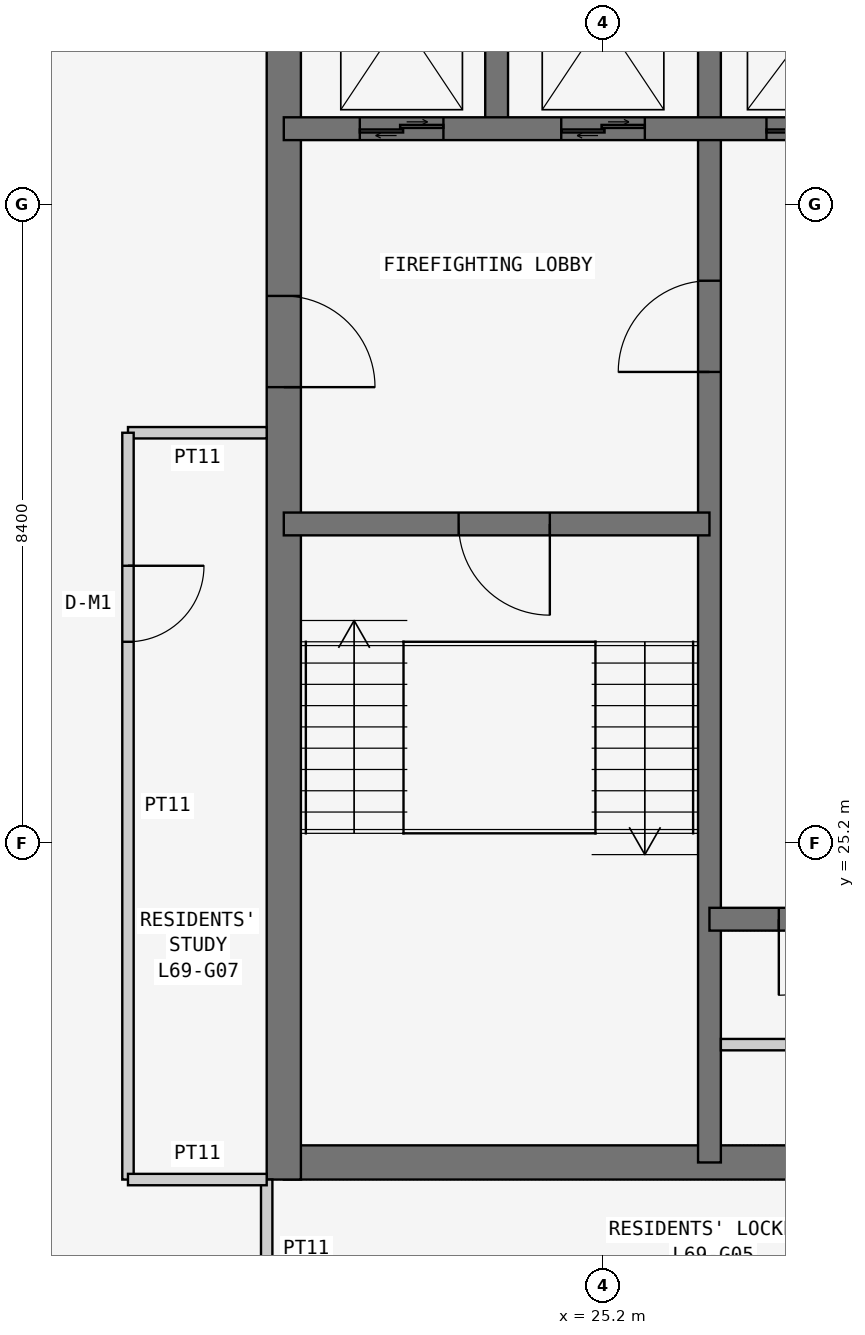
"""IFC4 building model, lengths in metres.
Left out: names, types, materials, properties, quantities, classifications, styles, units other than length and angle.
Written with IfcOpenShell. Run it as: python <this file> out.ifc"""

import sys

from ifc_helpers import new_model, si_unit, direction, frame, frame_2d, origin, place, context, subcontext, project, spatial, rectangle, extrude, element, fill, save


model = new_model("IFC4")
c1 = context("Model", 3, precision=1e-05, world=origin(), true_north=direction((0.0, 1.0)))
c2 = subcontext(c1, "Body", "Model", "MODEL_VIEW")
j1 = project(units=[si_unit("LENGTHUNIT", "METRE"), si_unit("PLANEANGLEUNIT", "RADIAN")], contexts=[c1])
p1 = place(None, origin())
s1 = spatial("IfcSite", under=j1, at=p1, CompositionType="ELEMENT")
p2 = place(p1, origin())
s2 = spatial("IfcBuilding", under=s1, at=p2, CompositionType="ELEMENT")
p3 = place(p2, frame((0.0, 0.0, 264.9)))
s3 = spatial("IfcBuildingStorey", under=s2, at=p3, CompositionType="ELEMENT", Elevation=264.9)
p4 = place(p3, frame((21.0, 21.0, 0.0), z_axis=(0.0, 0.0, 1.0), x_axis=(1.0, 0.0, 0.0)))
e1 = element("IfcWall", 1, at=p4, inside=s3, PredefinedType="SHEAR", context=c2, shape_type="SweptSolid", body=[
    extrude(rectangle(XDim=17.025, YDim=0.45, at=frame_2d((8.512, 0.0))), origin(), (0.0, 0.0, 1.0), 3.6),
])
p5 = place(p3, frame((21.0, 37.8, 0.0), z_axis=(0.0, 0.0, 1.0), x_axis=(0.0, -1.0, 0.0)))
e2 = element("IfcWall", 2, at=p5, inside=s3, PredefinedType="SHEAR", context=c2, shape_type="SweptSolid", body=[
    extrude(rectangle(XDim=17.025, YDim=0.45, at=frame_2d((8.513, 0.0))), origin(), (0.0, 0.0, 1.0), 3.6),
])
p6 = place(p5, frame((5.4, 0.0, 0.0)))
e3 = element("IfcOpeningElement", 3, at=p6, cuts=e2, PredefinedType="OPENING", context=c2, shape_type="SweptSolid", body=[
    extrude(rectangle(XDim=1.2, YDim=2.1, at=frame_2d((0.6, 1.05))), frame((0.0, 0.235, 0.0), z_axis=(0.0, -1.0, 0.0), x_axis=(1.0, 0.0, 0.0)), (0.0, 0.0, 1.0), 0.47),
])
p7 = place(p3, frame((26.6, 21.0, 0.0), z_axis=(0.0, 0.0, 1.0), x_axis=(0.0, 1.0, 0.0)))
e4 = element("IfcWall", 4, at=p7, inside=s3, PredefinedType="SHEAR", context=c2, shape_type="SweptSolid", body=[
    extrude(rectangle(XDim=16.8, YDim=0.3, at=frame_2d((8.4, 0.0))), origin(), (0.0, 0.0, 1.0), 3.6),
])
p8 = place(p7, frame((10.4, 0.0, 0.0)))
e5 = element("IfcOpeningElement", 5, at=p8, cuts=e4, PredefinedType="OPENING", context=c2, shape_type="SweptSolid", body=[
    extrude(rectangle(XDim=1.2, YDim=2.1, at=frame_2d((0.6, 1.05))), frame((0.0, 0.16, 0.0), z_axis=(0.0, -1.0, 0.0), x_axis=(1.0, 0.0, 0.0)), (0.0, 0.0, 1.0), 0.32),
])
p9 = place(p3, frame((21.0, 29.4, 0.0), z_axis=(0.0, 0.0, 1.0), x_axis=(1.0, 0.0, 0.0)))
e6 = element("IfcWall", 6, at=p9, inside=s3, PredefinedType="SHEAR", context=c2, shape_type="SweptSolid", body=[
    extrude(rectangle(XDim=5.6, YDim=0.3, at=frame_2d((2.8, 0.0))), origin(), (0.0, 0.0, 1.0), 3.6),
])
p10 = place(p9, frame((2.3, 0.0, 0.0)))
e7 = element("IfcOpeningElement", 7, at=p10, cuts=e6, PredefinedType="OPENING", context=c2, shape_type="SweptSolid", body=[
    extrude(rectangle(XDim=1.2, YDim=2.1, at=frame_2d((0.6, 1.05))), frame((0.0, 0.16, 0.0), z_axis=(0.0, -1.0, 0.0), x_axis=(1.0, 0.0, 0.0)), (0.0, 0.0, 1.0), 0.32),
])
p11 = place(p3, frame((21.0, 34.6, 0.0), z_axis=(0.0, 0.0, 1.0), x_axis=(1.0, 0.0, 0.0)))
e8 = element("IfcWall", 8, at=p11, inside=s3, PredefinedType="SHEAR", context=c2, shape_type="SweptSolid", body=[
    extrude(rectangle(XDim=11.2, YDim=0.3, at=frame_2d((5.6, 0.0))), origin(), (0.0, 0.0, 1.0), 3.6),
])
p12 = place(p11, frame((9.35, 0.0, 0.0)))
e9 = element("IfcOpeningElement", 9, at=p12, cuts=e8, PredefinedType="OPENING", context=c2, shape_type="SweptSolid", body=[
    extrude(rectangle(XDim=0.9, YDim=2.1, at=frame_2d((0.45, 1.05))), frame((0.0, 0.16, 0.0), z_axis=(0.0, -1.0, 0.0), x_axis=(1.0, 0.0, 0.0)), (0.0, 0.0, 1.0), 0.32),
])
p13 = place(p11, frame((1.0, 0.0, 0.0)))
e10 = element("IfcOpeningElement", 10, at=p13, cuts=e8, PredefinedType="OPENING", context=c2, shape_type="SweptSolid", body=[
    extrude(rectangle(XDim=1.1, YDim=2.1, at=frame_2d((0.55, 1.05))), frame((0.0, 0.16, 0.0), z_axis=(0.0, -1.0, 0.0), x_axis=(1.0, 0.0, 0.0)), (0.0, 0.0, 1.0), 0.32),
])
p14 = place(p11, frame((3.65, 0.0, 0.0)))
e11 = element("IfcOpeningElement", 11, at=p14, cuts=e8, PredefinedType="OPENING", context=c2, shape_type="SweptSolid", body=[
    extrude(rectangle(XDim=1.1, YDim=2.1, at=frame_2d((0.55, 1.05))), frame((0.0, 0.16, 0.0), z_axis=(0.0, -1.0, 0.0), x_axis=(1.0, 0.0, 0.0)), (0.0, 0.0, 1.0), 0.32),
])
p15 = place(p11, frame((6.35, 0.0, 0.0)))
e12 = element("IfcOpeningElement", 12, at=p15, cuts=e8, PredefinedType="OPENING", context=c2, shape_type="SweptSolid", body=[
    extrude(rectangle(XDim=1.3, YDim=2.1, at=frame_2d((0.65, 1.05))), frame((0.0, 0.16, 0.0), z_axis=(0.0, -1.0, 0.0), x_axis=(1.0, 0.0, 0.0)), (0.0, 0.0, 1.0), 0.32),
])
p16 = place(p3, frame((23.8, 34.6, 0.0), z_axis=(0.0, 0.0, 1.0), x_axis=(0.0, 1.0, 0.0)))
e13 = element("IfcWall", 13, at=p16, inside=s3, PredefinedType="SHEAR", context=c2, shape_type="SweptSolid", body=[
    extrude(rectangle(XDim=3.2, YDim=0.3, at=frame_2d((1.6, 0.0))), origin(), (0.0, 0.0, 1.0), 3.6),
])
p17 = place(p3, frame((26.6, 24.2, 0.0), z_axis=(0.0, 0.0, 1.0), x_axis=(1.0, 0.0, 0.0)))
e14 = element("IfcWall", 14, at=p17, inside=s3, PredefinedType="SHEAR", context=c2, shape_type="SweptSolid", body=[
    extrude(rectangle(XDim=11.2, YDim=0.3, at=frame_2d((5.6, 0.0))), origin(), (0.0, 0.0, 1.0), 3.6),
])
p18 = place(p17, frame((0.913, 0.0, 0.0)))
e15 = element("IfcOpeningElement", 15, at=p18, cuts=e14, PredefinedType="OPENING", context=c2, shape_type="SweptSolid", body=[
    extrude(rectangle(XDim=1.0, YDim=2.1, at=frame_2d((0.5, 1.05))), frame((0.0, 0.16, 0.0), z_axis=(0.0, -1.0, 0.0), x_axis=(1.0, 0.0, 0.0)), (0.0, 0.0, 1.0), 0.32),
])
p19 = place(p17, frame((3.7, 0.0, 0.0)))
e16 = element("IfcOpeningElement", 16, at=p19, cuts=e14, PredefinedType="OPENING", context=c2, shape_type="SweptSolid", body=[
    extrude(rectangle(XDim=1.0, YDim=2.1, at=frame_2d((0.5, 1.05))), frame((0.0, 0.16, 0.0), z_axis=(0.0, -1.0, 0.0), x_axis=(1.0, 0.0, 0.0)), (0.0, 0.0, 1.0), 0.32),
])
p20 = place(p17, frame((6.5, 0.0, 0.0)))
e17 = element("IfcOpeningElement", 17, at=p20, cuts=e14, PredefinedType="OPENING", context=c2, shape_type="SweptSolid", body=[
    extrude(rectangle(XDim=1.0, YDim=2.1, at=frame_2d((0.5, 1.05))), frame((0.0, 0.16, 0.0), z_axis=(0.0, -1.0, 0.0), x_axis=(1.0, 0.0, 0.0)), (0.0, 0.0, 1.0), 0.32),
])
p21 = place(p17, frame((9.1, 0.0, 0.0)))
e18 = element("IfcOpeningElement", 18, at=p21, cuts=e14, PredefinedType="OPENING", context=c2, shape_type="SweptSolid", body=[
    extrude(rectangle(XDim=1.1, YDim=2.1, at=frame_2d((0.55, 1.05))), frame((0.0, 0.16, 0.0), z_axis=(0.0, -1.0, 0.0), x_axis=(1.0, 0.0, 0.0)), (0.0, 0.0, 1.0), 0.32),
])
for number, where, z_axis, x_axis in (
    (19, (20.775, 20.775, 0.0), (0.0, 0.0, 1.0), (0.0, -1.0, 0.0)),
    (20, (20.775, 30.6, 0.0), (0.0, 0.0, 1.0), (-1.0, 0.0, 0.0)),
):
    element("IfcWall", number, at=place(p3, frame(where, z_axis=z_axis, x_axis=x_axis)), inside=s3, PredefinedType="PARTITIONING", context=c2, shape_type="SweptSolid", body=[
        extrude(rectangle(XDim=1.825, YDim=0.15, at=frame_2d((0.913, 0.0))), origin(), (0.0, 0.0, 1.0), 3.45),
    ])
p22 = place(p3, frame((18.95, 30.6, 0.0), z_axis=(0.0, 0.0, 1.0), x_axis=(0.0, -1.0, 0.0)))
e21 = element("IfcWall", 21, at=p22, inside=s3, PredefinedType="PARTITIONING", context=c2, shape_type="SweptSolid", body=[
    extrude(rectangle(XDim=9.825, YDim=0.15, at=frame_2d((4.913, 0.0))), origin(), (0.0, 0.0, 1.0), 3.45),
])
p23 = place(p22, frame((1.75, 0.0, 0.0)))
e22 = element("IfcOpeningElement", 22, at=p23, cuts=e21, PredefinedType="OPENING", context=c2, shape_type="SweptSolid", body=[
    extrude(rectangle(XDim=1.0, YDim=2.1, at=frame_2d((0.5, 1.05))), frame((0.0, 0.085, 0.0), z_axis=(0.0, -1.0, 0.0), x_axis=(1.0, 0.0, 0.0)), (0.0, 0.0, 1.0), 0.17),
])
p24 = place(p3, frame((18.95, 20.775, 0.0), z_axis=(0.0, 0.0, 1.0), x_axis=(1.0, 0.0, 0.0)))
e23 = element("IfcWall", 23, at=p24, inside=s3, PredefinedType="PARTITIONING", context=c2, shape_type="SweptSolid", body=[
    extrude(rectangle(XDim=1.825, YDim=0.15, at=frame_2d((0.913, 0.0))), origin(), (0.0, 0.0, 1.0), 3.45),
])
p25 = place(p3, frame((26.75, 22.55, 0.0), z_axis=(0.0, 0.0, 1.0), x_axis=(1.0, 0.0, 0.0)))
e24 = element("IfcWall", 24, at=p25, inside=s3, PredefinedType="PARTITIONING", context=c2, shape_type="SweptSolid", body=[
    extrude(rectangle(XDim=2.525, YDim=0.15, at=frame_2d((1.262, 0.0))), origin(), (0.0, 0.0, 1.0), 3.45),
])
p26 = place(p25, frame((0.863, 0.0, 0.0)))
e25 = element("IfcOpeningElement", 25, at=p26, cuts=e24, PredefinedType="OPENING", context=c2, shape_type="SweptSolid", body=[
    extrude(rectangle(XDim=0.8, YDim=2.1, at=frame_2d((0.4, 1.05))), frame((0.0, 0.085, 0.0), z_axis=(0.0, -1.0, 0.0), x_axis=(1.0, 0.0, 0.0)), (0.0, 0.0, 1.0), 0.17),
])
p27 = place(p23, origin())
e26 = element("IfcDoor", 26, at=p27, inside=s3, OperationType="SINGLE_SWING_LEFT", PredefinedType="DOOR", context=c2, shape_type="SweptSolid", body=[
    extrude(rectangle(XDim=1.0, YDim=2.1, at=frame_2d((0.5, 1.05))), frame((0.0, 0.025, 0.0), z_axis=(0.0, -1.0, 0.0), x_axis=(1.0, 0.0, 0.0)), (0.0, 0.0, 1.0), 0.05),
])
fill(e22, e26)
p28 = place(p6, origin())
e27 = element("IfcDoor", 27, at=p28, inside=s3, OperationType="SINGLE_SWING_RIGHT", PredefinedType="DOOR", context=c2, shape_type="SweptSolid", body=[
    extrude(rectangle(XDim=1.2, YDim=2.1, at=frame_2d((0.6, 1.05))), frame((0.0, 0.025, 0.0), z_axis=(0.0, -1.0, 0.0), x_axis=(1.0, 0.0, 0.0)), (0.0, 0.0, 1.0), 0.05),
])
fill(e3, e27)
p29 = place(p10, frame((1.2, 0.0, 0.0), z_axis=(0.0, 0.0, 1.0), x_axis=(-1.0, 0.0, 0.0)))
e28 = element("IfcDoor", 28, at=p29, inside=s3, OperationType="SINGLE_SWING_LEFT", PredefinedType="DOOR", context=c2, shape_type="SweptSolid", body=[
    extrude(rectangle(XDim=1.2, YDim=2.1, at=frame_2d((0.6, 1.05))), frame((0.0, 0.025, 0.0), z_axis=(0.0, -1.0, 0.0), x_axis=(1.0, 0.0, 0.0)), (0.0, 0.0, 1.0), 0.05),
])
fill(e7, e28)
p30 = place(p8, origin())
e29 = element("IfcDoor", 29, at=p30, inside=s3, OperationType="SINGLE_SWING_LEFT", PredefinedType="DOOR", context=c2, shape_type="SweptSolid", body=[
    extrude(rectangle(XDim=1.2, YDim=2.1, at=frame_2d((0.6, 1.05))), frame((0.0, 0.025, 0.0), z_axis=(0.0, -1.0, 0.0), x_axis=(1.0, 0.0, 0.0)), (0.0, 0.0, 1.0), 0.05),
])
fill(e5, e29)
p31 = place(p18, frame((1.0, 0.0, 0.0), z_axis=(0.0, 0.0, 1.0), x_axis=(-1.0, 0.0, 0.0)))
e30 = element("IfcDoor", 30, at=p31, inside=s3, OperationType="SINGLE_SWING_RIGHT", PredefinedType="DOOR", context=c2, shape_type="SweptSolid", body=[
    extrude(rectangle(XDim=1.0, YDim=2.1, at=frame_2d((0.5, 1.05))), frame((0.0, 0.025, 0.0), z_axis=(0.0, -1.0, 0.0), x_axis=(1.0, 0.0, 0.0)), (0.0, 0.0, 1.0), 0.05),
])
fill(e15, e30)
p32 = place(p13, origin())
e31 = element("IfcDoor", 31, at=p32, inside=s3, OperationType="DOUBLE_DOOR_SLIDING", PredefinedType="DOOR", context=c2, shape_type="SweptSolid", body=[
    extrude(rectangle(XDim=1.1, YDim=2.1, at=frame_2d((0.55, 1.05))), frame((0.0, 0.025, 0.0), z_axis=(0.0, -1.0, 0.0), x_axis=(1.0, 0.0, 0.0)), (0.0, 0.0, 1.0), 0.05),
])
fill(e10, e31)
p33 = place(p14, origin())
e32 = element("IfcDoor", 32, at=p33, inside=s3, OperationType="DOUBLE_DOOR_SLIDING", PredefinedType="DOOR", context=c2, shape_type="SweptSolid", body=[
    extrude(rectangle(XDim=1.1, YDim=2.1, at=frame_2d((0.55, 1.05))), frame((0.0, 0.025, 0.0), z_axis=(0.0, -1.0, 0.0), x_axis=(1.0, 0.0, 0.0)), (0.0, 0.0, 1.0), 0.05),
])
fill(e11, e32)
p34 = place(p15, origin())
e33 = element("IfcDoor", 33, at=p34, inside=s3, OperationType="DOUBLE_DOOR_SLIDING", PredefinedType="DOOR", context=c2, shape_type="SweptSolid", body=[
    extrude(rectangle(XDim=1.3, YDim=2.1, at=frame_2d((0.65, 1.05))), frame((0.0, 0.025, 0.0), z_axis=(0.0, -1.0, 0.0), x_axis=(1.0, 0.0, 0.0)), (0.0, 0.0, 1.0), 0.05),
])
fill(e12, e33)
save(model, sys.argv[1])
